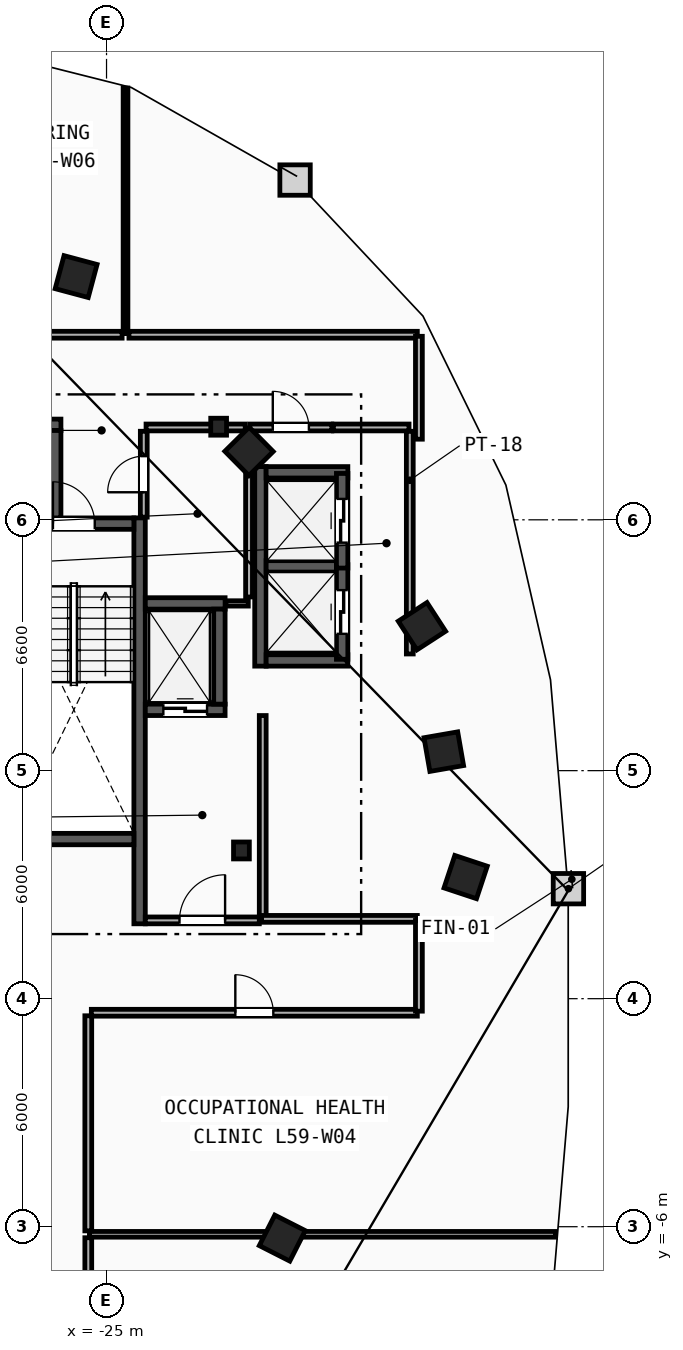
"""IFC4 building model, lengths in metres.
Left out: names, types, materials, properties, quantities, classifications, styles, units other than length and angle.
Written with IfcOpenShell. Run it as: python <this file> out.ifc"""

import sys

from ifc_helpers import new_model, si_unit, direction, frame, frame_2d, origin, origin_2d, place, context, subcontext, project, spatial, rectangle, i_section, extrude, element, fill, save


model = new_model("IFC4")
c1 = context("Model", 3, precision=1e-05, world=origin(), true_north=direction((0.0, 1.0)))
c2 = subcontext(c1, "Body", "Model", "MODEL_VIEW")
j1 = project(units=[si_unit("LENGTHUNIT", "METRE"), si_unit("PLANEANGLEUNIT", "RADIAN")], contexts=[c1])
p1 = place(None, origin())
s1 = spatial("IfcSite", under=j1, at=p1, CompositionType="ELEMENT")
p2 = place(p1, origin())
s2 = spatial("IfcBuilding", under=s1, at=p2, CompositionType="ELEMENT")
p3 = place(p2, frame((0.0, 0.0, 224.2)))
s3 = spatial("IfcBuildingStorey", under=s2, at=p3, CompositionType="ELEMENT", Elevation=224.2)
for number, where, z_axis, x_axis in (
    (1, (-21.45, 3.9, 0.0), (0.0, 0.0, 1.0), (1.0, 0.0, 0.0)),
    (2, (-22.05, 15.05, 0.0), (0.0, 0.0, 1.0), (1.0, 0.0, 0.0)),
):
    element("IfcColumn", number, at=place(p3, frame(where, z_axis=z_axis, x_axis=x_axis)), inside=s3, PredefinedType="COLUMN", context=c2, shape_type="SweptSolid", body=[
        extrude(i_section(OverallWidth=0.416, OverallDepth=0.446, WebThickness=0.039, FlangeThickness=0.063, FilletRadius=0.018, at=origin_2d()), origin(), (0.0, 0.0, 1.0), 3.6),
    ])
for number, where, z_axis, x_axis in (
    (3, (-15.55, 3.2, 0.0), (0.0, 0.0, 1.0), (0.315, 0.949, 0.0)),
    (4, (-16.125, 6.5, 0.0), (0.0, 0.0, 1.0), (-0.172, 0.985, 0.0)),
    (5, (-16.7, 9.8, 0.0), (0.0, 0.0, 1.0), (-0.544, 0.839, 0.0)),
    (6, (-21.25, 14.4, 0.0), (0.0, 0.0, 1.0), (-0.703, 0.711, 0.0)),
    (7, (-25.8, 19.0, 0.0), (0.0, 0.0, 1.0), (-0.966, 0.259, 0.0)),
    (8, (-20.375, -6.3, 0.0), (0.0, 0.0, 1.0), (0.453, 0.892, 0.0)),
):
    element("IfcColumn", number, at=place(p3, frame(where, z_axis=z_axis, x_axis=x_axis)), inside=s3, PredefinedType="COLUMN", context=c2, shape_type="SweptSolid", body=[
        extrude(rectangle(XDim=0.9, YDim=0.9, at=origin_2d()), origin(), (0.0, 0.0, 1.0), 3.6),
    ])
p4 = place(p3, frame((-24.13, 1.97, 0.0), z_axis=(0.0, 0.0, 1.0), x_axis=(0.0, 1.0, 0.0)))
e9 = element("IfcWall", 9, at=p4, inside=s3, PredefinedType="SHEAR", context=c2, shape_type="SweptSolid", body=[
    extrude(rectangle(XDim=10.68, YDim=0.3, at=frame_2d((5.34, 0.0))), origin(), (0.0, 0.0, 1.0), 3.34),
])
p5 = place(p3, frame((-27.44, 12.5, 0.0), z_axis=(0.0, 0.0, 1.0), x_axis=(1.0, 0.0, 0.0)))
e10 = element("IfcWall", 10, at=p5, inside=s3, PredefinedType="SHEAR", context=c2, shape_type="SweptSolid", body=[
    extrude(rectangle(XDim=3.16, YDim=0.3, at=frame_2d((1.58, 0.0))), origin(), (0.0, 0.0, 1.0), 3.34),
])
p6 = place(p5, frame((1.03, 0.0, 0.0)))
e11 = element("IfcOpeningElement", 11, at=p6, cuts=e10, PredefinedType="OPENING", context=c2, shape_type="SweptSolid", body=[
    extrude(rectangle(XDim=1.1, YDim=2.15, at=frame_2d((0.55, 1.075))), frame((0.0, 0.16, 0.0), z_axis=(0.0, -1.0, 0.0), x_axis=(1.0, 0.0, 0.0)), (0.0, 0.0, 1.0), 0.32),
])
p7 = place(p3, frame((-27.44, 4.2, 0.0), z_axis=(0.0, 0.0, 1.0), x_axis=(1.0, 0.0, 0.0)))
e12 = element("IfcWall", 12, at=p7, inside=s3, PredefinedType="SHEAR", context=c2, shape_type="SweptSolid", body=[
    extrude(rectangle(XDim=3.16, YDim=0.3, at=frame_2d((1.58, 0.0))), origin(), (0.0, 0.0, 1.0), 3.34),
])
p8 = place(p3, frame((-20.89, 2.15, 0.0), z_axis=(0.0, 0.0, 1.0), x_axis=(0.0, 1.0, 0.0)))
e13 = element("IfcWall", 13, at=p8, inside=s3, PredefinedType="PARTITIONING", context=c2, shape_type="SweptSolid", body=[
    extrude(rectangle(XDim=5.3, YDim=0.18, at=frame_2d((2.65, 0.0))), origin(), (0.0, 0.0, 1.0), 3.34),
])
p9 = place(p3, frame((-23.98, 2.06, 0.0), z_axis=(0.0, 0.0, 1.0), x_axis=(1.0, 0.0, 0.0)))
e14 = element("IfcWall", 14, at=p9, inside=s3, PredefinedType="PARTITIONING", context=c2, shape_type="SweptSolid", body=[
    extrude(rectangle(XDim=3.0, YDim=0.18, at=frame_2d((1.5, 0.0))), origin(), (0.0, 0.0, 1.0), 3.34),
])
p10 = place(p9, frame((0.9, 0.0, 0.0)))
e15 = element("IfcOpeningElement", 15, at=p10, cuts=e14, PredefinedType="OPENING", context=c2, shape_type="SweptSolid", body=[
    extrude(rectangle(XDim=1.2, YDim=2.15, at=frame_2d((0.6, 1.075))), frame((0.0, 0.1, 0.0), z_axis=(0.0, -1.0, 0.0), x_axis=(1.0, 0.0, 0.0)), (0.0, 0.0, 1.0), 0.2),
])
p11 = place(p3, frame((-23.98, 7.6, 0.0), z_axis=(0.0, 0.0, 1.0), x_axis=(1.0, 0.0, 0.0)))
e16 = element("IfcWall", 16, at=p11, inside=s3, PredefinedType="SHEAR", context=c2, shape_type="SweptSolid", body=[
    extrude(rectangle(XDim=2.1, YDim=0.3, at=frame_2d((1.05, 0.0))), origin(), (0.0, 0.0, 1.0), 3.34),
])
p12 = place(p11, frame((0.475, 0.0, 0.0)))
e17 = element("IfcOpeningElement", 17, at=p12, cuts=e16, PredefinedType="OPENING", context=c2, shape_type="SweptSolid", body=[
    extrude(rectangle(XDim=1.15, YDim=2.2, at=frame_2d((0.575, 1.1))), frame((0.0, 0.16, 0.0), z_axis=(0.0, -1.0, 0.0), x_axis=(1.0, 0.0, 0.0)), (0.0, 0.0, 1.0), 0.32),
])
p13 = place(p3, frame((-23.98, 10.4, 0.0), z_axis=(0.0, 0.0, 1.0), x_axis=(1.0, 0.0, 0.0)))
e18 = element("IfcWall", 18, at=p13, inside=s3, PredefinedType="SHEAR", context=c2, shape_type="SweptSolid", body=[
    extrude(rectangle(XDim=2.1, YDim=0.3, at=frame_2d((1.05, 0.0))), origin(), (0.0, 0.0, 1.0), 3.34),
])
for number, where, z_axis, x_axis in (
    (19, (-22.03, 7.75, 0.0), (0.0, 0.0, 1.0), (0.0, 1.0, 0.0)),
    (20, (-28.7, 15.1, 0.0), (0.0, 0.0, 1.0), (1.0, 0.0, 0.0)),
):
    element("IfcWall", number, at=place(p3, frame(where, z_axis=z_axis, x_axis=x_axis)), inside=s3, PredefinedType="SHEAR", context=c2, shape_type="SweptSolid", body=[
        extrude(rectangle(XDim=2.5, YDim=0.3, at=frame_2d((1.25, 0.0))), origin(), (0.0, 0.0, 1.0), 3.34),
    ])
p14 = place(p3, frame((-26.35, 12.65, 0.0), z_axis=(0.0, 0.0, 1.0), x_axis=(0.0, 1.0, 0.0)))
e21 = element("IfcWall", 21, at=p14, inside=s3, PredefinedType="SHEAR", context=c2, shape_type="SweptSolid", body=[
    extrude(rectangle(XDim=2.3, YDim=0.3, at=frame_2d((1.15, 0.0))), origin(), (0.0, 0.0, 1.0), 3.34),
])
p15 = place(p3, frame((-20.95, 8.75, 0.0), z_axis=(0.0, 0.0, 1.0), x_axis=(0.0, 1.0, 0.0)))
e22 = element("IfcWall", 22, at=p15, inside=s3, PredefinedType="SHEAR", context=c2, shape_type="SweptSolid", body=[
    extrude(rectangle(XDim=5.25, YDim=0.3, at=frame_2d((2.625, 0.0))), origin(), (0.0, 0.0, 1.0), 3.34),
])
for number, where, z_axis, x_axis in (
    (23, (-20.8, 8.9, 0.0), (0.0, 0.0, 1.0), (1.0, 0.0, 0.0)),
    (24, (-20.8, 13.85, 0.0), (0.0, 0.0, 1.0), (1.0, 0.0, 0.0)),
):
    element("IfcWall", number, at=place(p3, frame(where, z_axis=z_axis, x_axis=x_axis)), inside=s3, PredefinedType="SHEAR", context=c2, shape_type="SweptSolid", body=[
        extrude(rectangle(XDim=2.15, YDim=0.3, at=frame_2d((1.075, 0.0))), origin(), (0.0, 0.0, 1.0), 3.34),
    ])
p16 = place(p3, frame((-20.8, 11.375, 0.0), z_axis=(0.0, 0.0, 1.0), x_axis=(1.0, 0.0, 0.0)))
e25 = element("IfcWall", 25, at=p16, inside=s3, PredefinedType="SHEAR", context=c2, shape_type="SweptSolid", body=[
    extrude(rectangle(XDim=1.85, YDim=0.3, at=frame_2d((0.925, 0.0))), origin(), (0.0, 0.0, 1.0), 3.34),
])
p17 = place(p3, frame((-18.8, 8.93, 0.0), z_axis=(0.0, 0.0, 1.0), x_axis=(0.0, 1.0, 0.0)))
e26 = element("IfcWall", 26, at=p17, inside=s3, PredefinedType="SHEAR", context=c2, shape_type="SweptSolid", body=[
    extrude(rectangle(XDim=2.49, YDim=0.3, at=frame_2d((1.245, 0.0))), origin(), (0.0, 0.0, 1.0), 3.34),
])
p18 = place(p17, frame((0.67, 0.0, 0.0)))
e27 = element("IfcOpeningElement", 27, at=p18, cuts=e26, PredefinedType="OPENING", context=c2, shape_type="SweptSolid", body=[
    extrude(rectangle(XDim=1.15, YDim=2.2, at=frame_2d((0.575, 1.1))), frame((0.0, 0.16, 0.0), z_axis=(0.0, -1.0, 0.0), x_axis=(1.0, 0.0, 0.0)), (0.0, 0.0, 1.0), 0.32),
])
p19 = place(p3, frame((-18.8, 11.33, 0.0), z_axis=(0.0, 0.0, 1.0), x_axis=(0.0, 1.0, 0.0)))
e28 = element("IfcWall", 28, at=p19, inside=s3, PredefinedType="SHEAR", context=c2, shape_type="SweptSolid", body=[
    extrude(rectangle(XDim=2.49, YDim=0.3, at=frame_2d((1.245, 0.0))), origin(), (0.0, 0.0, 1.0), 3.34),
])
p20 = place(p19, frame((0.67, 0.0, 0.0)))
e29 = element("IfcOpeningElement", 29, at=p20, cuts=e28, PredefinedType="OPENING", context=c2, shape_type="SweptSolid", body=[
    extrude(rectangle(XDim=1.15, YDim=2.2, at=frame_2d((0.575, 1.1))), frame((0.0, 0.16, 0.0), z_axis=(0.0, -1.0, 0.0), x_axis=(1.0, 0.0, 0.0)), (0.0, 0.0, 1.0), 0.32),
])
p21 = place(p3, frame((-17.02, 9.07, 0.0), z_axis=(0.0, 0.0, 1.0), x_axis=(0.0, 1.0, 0.0)))
e30 = element("IfcWall", 30, at=p21, inside=s3, PredefinedType="PARTITIONING", context=c2, shape_type="SweptSolid", body=[
    extrude(rectangle(XDim=5.86, YDim=0.18, at=frame_2d((2.93, 0.0))), origin(), (0.0, 0.0, 1.0), 3.34),
])
p22 = place(p3, frame((-21.23, 15.03, 0.0), z_axis=(0.0, 0.0, 1.0), x_axis=(1.0, 0.0, 0.0)))
e31 = element("IfcWall", 31, at=p22, inside=s3, PredefinedType="PARTITIONING", context=c2, shape_type="SweptSolid", body=[
    extrude(rectangle(XDim=2.16, YDim=0.18, at=frame_2d((1.08, 0.0))), origin(), (0.0, 0.0, 1.0), 3.34),
])
p23 = place(p22, frame((0.605, 0.0, 0.0)))
e32 = element("IfcOpeningElement", 32, at=p23, cuts=e31, PredefinedType="OPENING", context=c2, shape_type="SweptSolid", body=[
    extrude(rectangle(XDim=0.95, YDim=2.1, at=frame_2d((0.475, 1.05))), frame((0.0, 0.1, 0.0), z_axis=(0.0, -1.0, 0.0), x_axis=(1.0, 0.0, 0.0)), (0.0, 0.0, 1.0), 0.2),
])
p24 = place(p3, frame((-19.03, 15.03, 0.0), z_axis=(0.0, 0.0, 1.0), x_axis=(1.0, 0.0, 0.0)))
e33 = element("IfcWall", 33, at=p24, inside=s3, PredefinedType="PARTITIONING", context=c2, shape_type="SweptSolid", body=[
    extrude(rectangle(XDim=1.99, YDim=0.18, at=frame_2d((0.995, 0.0))), origin(), (0.0, 0.0, 1.0), 3.34),
])
p25 = place(p3, frame((-21.86, 10.4, 0.0), z_axis=(0.0, 0.0, 1.0), x_axis=(1.0, 0.0, 0.0)))
e34 = element("IfcWall", 34, at=p25, inside=s3, PredefinedType="PARTITIONING", context=c2, shape_type="SweptSolid", body=[
    extrude(rectangle(XDim=0.59, YDim=0.14, at=frame_2d((0.295, 0.0))), origin(), (0.0, 0.0, 1.0), 3.34),
])
p26 = place(p3, frame((-21.25, 10.57, 0.0), z_axis=(0.0, 0.0, 1.0), x_axis=(0.0, 1.0, 0.0)))
e35 = element("IfcWall", 35, at=p26, inside=s3, PredefinedType="PARTITIONING", context=c2, shape_type="SweptSolid", body=[
    extrude(rectangle(XDim=4.36, YDim=0.18, at=frame_2d((2.18, 0.0))), origin(), (0.0, 0.0, 1.0), 3.34),
])
p27 = place(p3, frame((-23.96, 15.03, 0.0), z_axis=(0.0, 0.0, 1.0), x_axis=(1.0, 0.0, 0.0)))
e36 = element("IfcWall", 36, at=p27, inside=s3, PredefinedType="PARTITIONING", context=c2, shape_type="SweptSolid", body=[
    extrude(rectangle(XDim=2.61, YDim=0.18, at=frame_2d((1.305, 0.0))), origin(), (0.0, 0.0, 1.0), 2.413),
])
p28 = place(p3, frame((-24.02, 12.67, 0.0), z_axis=(0.0, 0.0, 1.0), x_axis=(0.0, 1.0, 0.0)))
e37 = element("IfcWall", 37, at=p28, inside=s3, PredefinedType="PARTITIONING", context=c2, shape_type="SweptSolid", body=[
    extrude(rectangle(XDim=2.26, YDim=0.18, at=frame_2d((1.13, 0.0))), origin(), (0.0, 0.0, 1.0), 3.34),
])
p29 = place(p28, frame((0.655, 0.0, 0.0)))
e38 = element("IfcOpeningElement", 38, at=p29, cuts=e37, PredefinedType="OPENING", context=c2, shape_type="SweptSolid", body=[
    extrude(rectangle(XDim=0.95, YDim=2.1, at=frame_2d((0.475, 1.05))), frame((0.0, 0.1, 0.0), z_axis=(0.0, -1.0, 0.0), x_axis=(1.0, 0.0, 0.0)), (0.0, 0.0, 1.0), 0.2),
])
p30 = place(p3, frame((-25.45, -6.2, 0.0), z_axis=(0.0, 0.0, 1.0), x_axis=(1.0, 0.0, 0.0)))
e39 = element("IfcWall", 39, at=p30, inside=s3, PredefinedType="PARTITIONING", context=c2, shape_type="SweptSolid", body=[
    extrude(rectangle(XDim=12.267, YDim=0.15, at=frame_2d((6.133, 0.0))), origin(), (0.0, 0.0, 1.0), 3.34),
])
p31 = place(p3, frame((-24.5, 17.5, 0.0), z_axis=(0.0, 0.0, 1.0), x_axis=(0.0, 1.0, 0.0)))
e40 = element("IfcWall", 40, at=p31, inside=s3, PredefinedType="PARTITIONING", context=c2, shape_type="SweptSolid", body=[
    extrude(rectangle(XDim=6.463, YDim=0.125, at=frame_2d((3.231, 0.0))), origin(), (0.0, 0.0, 1.0), 3.34),
])
p32 = place(p3, frame((-25.48, -11.178, 0.0), z_axis=(0.0, 0.0, 1.0), x_axis=(0.0, 1.0, 0.0)))
e41 = element("IfcWall", 41, at=p32, inside=s3, PredefinedType="PARTITIONING", context=c2, shape_type="SweptSolid", body=[
    extrude(rectangle(XDim=4.888, YDim=0.18, at=frame_2d((2.444, 0.0))), origin(), (0.0, 0.0, 1.0), 3.34),
])
p33 = place(p3, frame((-25.4, -0.37, 0.0), z_axis=(0.0, 0.0, 1.0), x_axis=(1.0, 0.0, 0.0)))
e42 = element("IfcWall", 42, at=p33, inside=s3, PredefinedType="PARTITIONING", context=c2, shape_type="SweptSolid", body=[
    extrude(rectangle(XDim=8.578, YDim=0.18, at=frame_2d((4.289, 0.0))), origin(), (0.0, 0.0, 1.0), 3.34),
])
p34 = place(p33, frame((3.789, 0.0, 0.0)))
e43 = element("IfcOpeningElement", 43, at=p34, cuts=e42, PredefinedType="OPENING", context=c2, shape_type="SweptSolid", body=[
    extrude(rectangle(XDim=1.0, YDim=2.15, at=frame_2d((0.5, 1.075))), frame((0.0, 0.1, 0.0), z_axis=(0.0, -1.0, 0.0), x_axis=(1.0, 0.0, 0.0)), (0.0, 0.0, 1.0), 0.2),
])
p35 = place(p3, frame((-16.822, 17.47, 0.0), z_axis=(0.0, 0.0, 1.0), x_axis=(-1.0, 0.0, 0.0)))
e44 = element("IfcWall", 44, at=p35, inside=s3, PredefinedType="PARTITIONING", context=c2, shape_type="SweptSolid", body=[
    extrude(rectangle(XDim=7.588, YDim=0.18, at=frame_2d((3.794, 0.0))), origin(), (0.0, 0.0, 1.0), 3.34),
])
p36 = place(p3, frame((-25.48, -6.11, 0.0), z_axis=(0.0, 0.0, 1.0), x_axis=(0.0, 1.0, 0.0)))
e45 = element("IfcWall", 45, at=p36, inside=s3, PredefinedType="PARTITIONING", context=c2, shape_type="SweptSolid", body=[
    extrude(rectangle(XDim=5.66, YDim=0.18, at=frame_2d((2.83, 0.0))), origin(), (0.0, 0.0, 1.0), 3.34),
])
p37 = place(p3, frame((-16.822, 2.1, 0.0), z_axis=(0.0, 0.0, 1.0), x_axis=(-1.0, 0.0, 0.0)))
e46 = element("IfcWall", 46, at=p37, inside=s3, PredefinedType="PARTITIONING", context=c2, shape_type="SweptSolid", body=[
    extrude(rectangle(XDim=4.098, YDim=0.18, at=frame_2d((2.049, 0.0))), origin(), (0.0, 0.0, 1.0), 3.34),
])
p38 = place(p3, frame((-16.78, 14.721, 0.0), z_axis=(0.0, 0.0, 1.0), x_axis=(0.0, 1.0, 0.0)))
e47 = element("IfcWall", 47, at=p38, inside=s3, PredefinedType="PARTITIONING", context=c2, shape_type="SweptSolid", body=[
    extrude(rectangle(XDim=2.707, YDim=0.18, at=frame_2d((1.354, 0.0))), origin(), (0.0, 0.0, 1.0), 3.34),
])
p39 = place(p3, frame((-16.78, -0.329, 0.0), z_axis=(0.0, 0.0, 1.0), x_axis=(0.0, 1.0, 0.0)))
e48 = element("IfcWall", 48, at=p39, inside=s3, PredefinedType="PARTITIONING", context=c2, shape_type="SweptSolid", body=[
    extrude(rectangle(XDim=2.387, YDim=0.18, at=frame_2d((1.194, 0.0))), origin(), (0.0, 0.0, 1.0), 3.34),
])
p40 = place(p3, frame((-24.59, 17.47, 0.0), z_axis=(0.0, 0.0, 1.0), x_axis=(-1.0, 0.0, 0.0)))
e49 = element("IfcWall", 49, at=p40, inside=s3, PredefinedType="PARTITIONING", context=c2, shape_type="SweptSolid", body=[
    extrude(rectangle(XDim=6.82, YDim=0.18, at=frame_2d((3.41, 0.0))), origin(), (0.0, 0.0, 1.0), 3.34),
])
p41 = place(p40, frame((2.91, 0.0, 0.0)))
e50 = element("IfcOpeningElement", 50, at=p41, cuts=e49, PredefinedType="OPENING", context=c2, shape_type="SweptSolid", body=[
    extrude(rectangle(XDim=1.0, YDim=2.15, at=frame_2d((0.5, 1.075))), frame((0.0, 0.1, 0.0), z_axis=(0.0, -1.0, 0.0), x_axis=(1.0, 0.0, 0.0)), (0.0, 0.0, 1.0), 0.2),
])
p42 = place(p6, origin())
e51 = element("IfcDoor", 51, at=p42, inside=s3, OperationType="SINGLE_SWING_LEFT", PredefinedType="DOOR", context=c2, shape_type="SweptSolid", body=[
    extrude(rectangle(XDim=1.1, YDim=2.15, at=frame_2d((0.55, 1.075))), frame((0.0, 0.025, 0.0), z_axis=(0.0, -1.0, 0.0), x_axis=(1.0, 0.0, 0.0)), (0.0, 0.0, 1.0), 0.05),
])
fill(e11, e51)
p43 = place(p10, origin())
e52 = element("IfcDoor", 52, at=p43, inside=s3, OperationType="SINGLE_SWING_RIGHT", PredefinedType="DOOR", context=c2, shape_type="SweptSolid", body=[
    extrude(rectangle(XDim=1.2, YDim=2.15, at=frame_2d((0.6, 1.075))), frame((0.0, 0.025, 0.0), z_axis=(0.0, -1.0, 0.0), x_axis=(1.0, 0.0, 0.0)), (0.0, 0.0, 1.0), 0.05),
])
fill(e15, e52)
p44 = place(p12, origin())
e53 = element("IfcDoor", 53, at=p44, inside=s3, OperationType="SLIDING_TO_LEFT", PredefinedType="TRAPDOOR", context=c2, shape_type="SweptSolid", body=[
    extrude(rectangle(XDim=1.15, YDim=2.2, at=frame_2d((0.575, 1.1))), frame((0.0, 0.025, 0.0), z_axis=(0.0, -1.0, 0.0), x_axis=(1.0, 0.0, 0.0)), (0.0, 0.0, 1.0), 0.05),
])
fill(e17, e53)
p45 = place(p18, origin())
e54 = element("IfcDoor", 54, at=p45, inside=s3, OperationType="SLIDING_TO_LEFT", PredefinedType="TRAPDOOR", context=c2, shape_type="SweptSolid", body=[
    extrude(rectangle(XDim=1.15, YDim=2.2, at=frame_2d((0.575, 1.1))), frame((0.0, 0.025, 0.0), z_axis=(0.0, -1.0, 0.0), x_axis=(1.0, 0.0, 0.0)), (0.0, 0.0, 1.0), 0.05),
])
fill(e27, e54)
p46 = place(p20, origin())
e55 = element("IfcDoor", 55, at=p46, inside=s3, OperationType="SLIDING_TO_LEFT", PredefinedType="TRAPDOOR", context=c2, shape_type="SweptSolid", body=[
    extrude(rectangle(XDim=1.15, YDim=2.2, at=frame_2d((0.575, 1.1))), frame((0.0, 0.025, 0.0), z_axis=(0.0, -1.0, 0.0), x_axis=(1.0, 0.0, 0.0)), (0.0, 0.0, 1.0), 0.05),
])
fill(e29, e55)
p47 = place(p34, origin())
e56 = element("IfcDoor", 56, at=p47, inside=s3, OperationType="SINGLE_SWING_LEFT", PredefinedType="DOOR", context=c2, shape_type="SweptSolid", body=[
    extrude(rectangle(XDim=1.0, YDim=2.15, at=frame_2d((0.5, 1.075))), frame((0.0, 0.025, 0.0), z_axis=(0.0, -1.0, 0.0), x_axis=(1.0, 0.0, 0.0)), (0.0, 0.0, 1.0), 0.05),
])
fill(e43, e56)
p48 = place(p29, origin())
e57 = element("IfcDoor", 57, at=p48, inside=s3, OperationType="SINGLE_SWING_LEFT", PredefinedType="DOOR", context=c2, shape_type="SweptSolid", body=[
    extrude(rectangle(XDim=0.95, YDim=2.1, at=frame_2d((0.475, 1.05))), frame((0.0, 0.025, 0.0), z_axis=(0.0, -1.0, 0.0), x_axis=(1.0, 0.0, 0.0)), (0.0, 0.0, 1.0), 0.05),
])
fill(e38, e57)
p49 = place(p23, origin())
e58 = element("IfcDoor", 58, at=p49, inside=s3, OperationType="SINGLE_SWING_LEFT", PredefinedType="DOOR", context=c2, shape_type="SweptSolid", body=[
    extrude(rectangle(XDim=0.95, YDim=2.1, at=frame_2d((0.475, 1.05))), frame((0.0, 0.025, 0.0), z_axis=(0.0, -1.0, 0.0), x_axis=(1.0, 0.0, 0.0)), (0.0, 0.0, 1.0), 0.05),
])
fill(e32, e58)
save(model, sys.argv[1])
